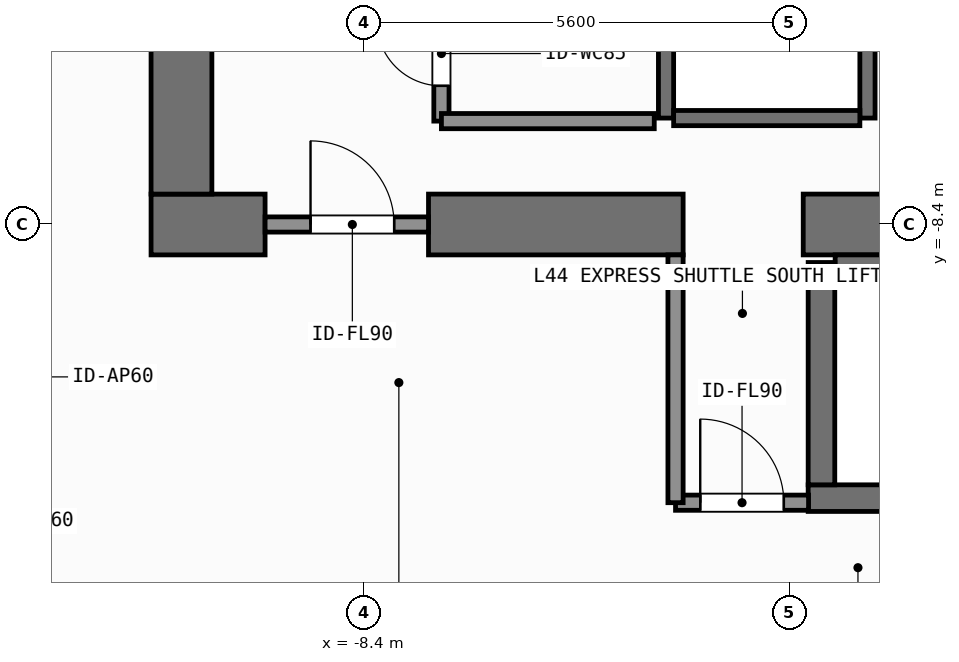
"""IFC4 building model, lengths in metres.
Left out: names, types, materials, properties, quantities, classifications, styles, units other than length and angle.
Written with IfcOpenShell. Run it as: python <this file> out.ifc"""

import sys

from ifc_helpers import new_model, si_unit, direction, frame, frame_2d, origin, place, context, subcontext, project, spatial, rectangle, extrude, element, fill, save


model = new_model("IFC4")
c1 = context("Model", 3, precision=1e-05, world=origin(), true_north=direction((0.0, 1.0)))
c2 = subcontext(c1, "Body", "Model", "MODEL_VIEW")
j1 = project(units=[si_unit("LENGTHUNIT", "METRE"), si_unit("PLANEANGLEUNIT", "RADIAN")], contexts=[c1])
p1 = place(None, origin())
s1 = spatial("IfcSite", under=j1, at=p1, CompositionType="ELEMENT")
p2 = place(p1, origin())
s2 = spatial("IfcBuilding", under=s1, at=p2, CompositionType="ELEMENT")
p3 = place(p2, frame((0.0, 0.0, 179.7)))
s3 = spatial("IfcBuildingStorey", under=s2, at=p3, CompositionType="ELEMENT", Elevation=179.7)
p4 = place(p3, frame((-11.2, -8.4, 0.0), z_axis=(0.0, 0.0, 1.0), x_axis=(1.0, 0.0, 0.0)))
e1 = element("IfcWall", 1, at=p4, inside=s3, PredefinedType="SHEAR", context=c2, shape_type="SweptSolid", body=[
    extrude(rectangle(XDim=1.5, YDim=0.8, at=frame_2d((0.75, 0.0))), origin(), (0.0, 0.0, 1.0), 3.9),
])
p5 = place(p3, frame((-7.55, -8.4, 0.0), z_axis=(0.0, 0.0, 1.0), x_axis=(1.0, 0.0, 0.0)))
e2 = element("IfcWall", 2, at=p5, inside=s3, PredefinedType="SHEAR", context=c2, shape_type="SweptSolid", body=[
    extrude(rectangle(XDim=3.35, YDim=0.8, at=frame_2d((1.675, 0.0))), origin(), (0.0, 0.0, 1.0), 3.9),
])
p6 = place(p3, frame((-2.62, -8.4, 0.0), z_axis=(0.0, 0.0, 1.0), x_axis=(1.0, 0.0, 0.0)))
e3 = element("IfcWall", 3, at=p6, inside=s3, PredefinedType="SHEAR", context=c2, shape_type="SweptSolid", body=[
    extrude(rectangle(XDim=7.27, YDim=0.8, at=frame_2d((3.635, 0.0))), origin(), (0.0, 0.0, 1.0), 3.9),
])
p7 = place(p3, frame((-10.8, -8.0, 0.0), z_axis=(0.0, 0.0, 1.0), x_axis=(0.0, 1.0, 0.0)))
e4 = element("IfcWall", 4, at=p7, inside=s3, PredefinedType="SHEAR", context=c2, shape_type="SweptSolid", body=[
    extrude(rectangle(XDim=16.0, YDim=0.8, at=frame_2d((8.0, 0.0))), origin(), (0.0, 0.0, 1.0), 3.9),
])
p8 = place(p3, frame((-2.555, -12.0, 0.0), z_axis=(0.0, 0.0, 1.0), x_axis=(1.0, 0.0, 0.0)))
e5 = element("IfcWall", 5, at=p8, inside=s3, PredefinedType="SHEAR", context=c2, shape_type="SweptSolid", body=[
    extrude(rectangle(XDim=7.31, YDim=0.35, at=frame_2d((3.655, 0.0))), origin(), (0.0, 0.0, 1.0), 3.9),
])
p9 = place(p3, frame((-2.2, -8.913, 0.0), z_axis=(0.0, 0.0, 1.0), x_axis=(1.0, 0.0, 0.0)))
e6 = element("IfcWall", 6, at=p9, inside=s3, PredefinedType="SHEAR", context=c2, shape_type="SweptSolid", body=[
    extrude(rectangle(XDim=6.6, YDim=0.225, at=frame_2d((3.3, 0.0))), origin(), (0.0, 0.0, 1.0), 3.9),
])
p10 = place(p3, frame((-2.38, -11.825, 0.0), z_axis=(0.0, 0.0, 1.0), x_axis=(0.0, 1.0, 0.0)))
e7 = element("IfcWall", 7, at=p10, inside=s3, PredefinedType="SHEAR", context=c2, shape_type="SweptSolid", body=[
    extrude(rectangle(XDim=2.925, YDim=0.35, at=frame_2d((1.462, 0.0))), origin(), (0.0, 0.0, 1.0), 3.9),
])
for number, where, z_axis, x_axis in (
    (8, (-4.425, -7.0, 0.0), (0.0, 0.0, 1.0), (0.0, 1.0, 0.0)),
    (9, (-1.775, -7.0, 0.0), (0.0, 0.0, 1.0), (0.0, 1.0, 0.0)),
):
    element("IfcWall", number, at=place(p3, frame(where, z_axis=z_axis, x_axis=x_axis)), inside=s3, PredefinedType="SHEAR", context=c2, shape_type="SweptSolid", body=[
        extrude(rectangle(XDim=2.8, YDim=0.2, at=frame_2d((1.4, 0.0))), origin(), (0.0, 0.0, 1.0), 3.68),
    ])
p11 = place(p3, frame((-4.325, -7.0, 0.0), z_axis=(0.0, 0.0, 1.0), x_axis=(1.0, 0.0, 0.0)))
e10 = element("IfcWall", 10, at=p11, inside=s3, PredefinedType="SHEAR", context=c2, shape_type="SweptSolid", body=[
    extrude(rectangle(XDim=2.45, YDim=0.2, at=frame_2d((1.225, 0.0))), origin(), (0.0, 0.0, 1.0), 3.68),
])
p12 = place(p3, frame((-9.7, -8.4, 0.0), z_axis=(0.0, 0.0, 1.0), x_axis=(1.0, 0.0, 0.0)))
e11 = element("IfcWall", 11, at=p12, inside=s3, PredefinedType="SOLIDWALL", context=c2, shape_type="SweptSolid", body=[
    extrude(rectangle(XDim=2.15, YDim=0.2, at=frame_2d((1.075, 0.0))), origin(), (0.0, 0.0, 1.0), 2.82),
])
p13 = place(p12, frame((0.598, 0.0, 0.0)))
e12 = element("IfcOpeningElement", 12, at=p13, cuts=e11, PredefinedType="OPENING", context=c2, shape_type="SweptSolid", body=[
    extrude(rectangle(XDim=1.1, YDim=2.15, at=frame_2d((0.55, 1.075))), frame((0.0, 0.11, 0.0), z_axis=(0.0, -1.0, 0.0), x_axis=(1.0, 0.0, 0.0)), (0.0, 0.0, 1.0), 0.22),
])
p14 = place(p3, frame((-4.3, -12.06, 0.0), z_axis=(0.0, 0.0, 1.0), x_axis=(1.0, 0.0, 0.0)))
e13 = element("IfcWall", 13, at=p14, inside=s3, PredefinedType="SOLIDWALL", context=c2, shape_type="SweptSolid", body=[
    extrude(rectangle(XDim=1.75, YDim=0.2, at=frame_2d((0.875, 0.0))), origin(), (0.0, 0.0, 1.0), 3.68),
])
p15 = place(p14, frame((0.325, 0.0, 0.0)))
e14 = element("IfcOpeningElement", 14, at=p15, cuts=e13, PredefinedType="OPENING", context=c2, shape_type="SweptSolid", body=[
    extrude(rectangle(XDim=1.1, YDim=2.15, at=frame_2d((0.55, 1.075))), frame((0.0, 0.11, 0.0), z_axis=(0.0, -1.0, 0.0), x_axis=(1.0, 0.0, 0.0)), (0.0, 0.0, 1.0), 0.22),
])
p16 = place(p3, frame((-7.38, -7.04, 0.0), z_axis=(0.0, 0.0, 1.0), x_axis=(0.0, 1.0, 0.0)))
e15 = element("IfcWall", 15, at=p16, inside=s3, PredefinedType="SOLIDWALL", context=c2, shape_type="SweptSolid", body=[
    extrude(rectangle(XDim=1.93, YDim=0.2, at=frame_2d((0.965, 0.0))), origin(), (0.0, 0.0, 1.0), 3.68),
])
p17 = place(p16, frame((0.464, 0.0, 0.0)))
e16 = element("IfcOpeningElement", 16, at=p17, cuts=e15, PredefinedType="OPENING", context=c2, shape_type="SweptSolid", body=[
    extrude(rectangle(XDim=0.85, YDim=2.1, at=frame_2d((0.425, 1.05))), frame((0.0, 0.11, 0.0), z_axis=(0.0, -1.0, 0.0), x_axis=(1.0, 0.0, 0.0)), (0.0, 0.0, 1.0), 0.22),
])
p18 = place(p3, frame((-4.3, -12.06, 0.0), z_axis=(0.0, 0.0, 1.0), x_axis=(0.0, 1.0, 0.0)))
e17 = element("IfcWall", 17, at=p18, inside=s3, PredefinedType="SOLIDWALL", context=c2, shape_type="SweptSolid", body=[
    extrude(rectangle(XDim=3.26, YDim=0.2, at=frame_2d((1.63, 0.0))), origin(), (0.0, 0.0, 1.0), 3.68),
])
p19 = place(p3, frame((-7.38, -7.04, 0.0), z_axis=(0.0, 0.0, 1.0), x_axis=(1.0, 0.0, 0.0)))
e18 = element("IfcWall", 18, at=p19, inside=s3, PredefinedType="SOLIDWALL", context=c2, shape_type="SweptSolid", body=[
    extrude(rectangle(XDim=2.8, YDim=0.2, at=frame_2d((1.4, 0.0))), origin(), (0.0, 0.0, 1.0), 3.68),
])
p20 = place(p13, origin())
e19 = element("IfcDoor", 19, at=p20, inside=s3, OperationType="SINGLE_SWING_LEFT", PredefinedType="DOOR", context=c2, shape_type="SweptSolid", body=[
    extrude(rectangle(XDim=1.1, YDim=2.15, at=frame_2d((0.55, 1.075))), frame((0.0, 0.025, 0.0), z_axis=(0.0, -1.0, 0.0), x_axis=(1.0, 0.0, 0.0)), (0.0, 0.0, 1.0), 0.05),
])
fill(e12, e19)
p21 = place(p15, origin())
e20 = element("IfcDoor", 20, at=p21, inside=s3, OperationType="SINGLE_SWING_LEFT", PredefinedType="DOOR", context=c2, shape_type="SweptSolid", body=[
    extrude(rectangle(XDim=1.1, YDim=2.15, at=frame_2d((0.55, 1.075))), frame((0.0, 0.025, 0.0), z_axis=(0.0, -1.0, 0.0), x_axis=(1.0, 0.0, 0.0)), (0.0, 0.0, 1.0), 0.05),
])
fill(e14, e20)
p22 = place(p17, origin())
e21 = element("IfcDoor", 21, at=p22, inside=s3, OperationType="SINGLE_SWING_RIGHT", PredefinedType="DOOR", context=c2, shape_type="SweptSolid", body=[
    extrude(rectangle(XDim=0.85, YDim=2.1, at=frame_2d((0.425, 1.05))), frame((0.0, 0.025, 0.0), z_axis=(0.0, -1.0, 0.0), x_axis=(1.0, 0.0, 0.0)), (0.0, 0.0, 1.0), 0.05),
])
fill(e16, e21)
save(model, sys.argv[1])
